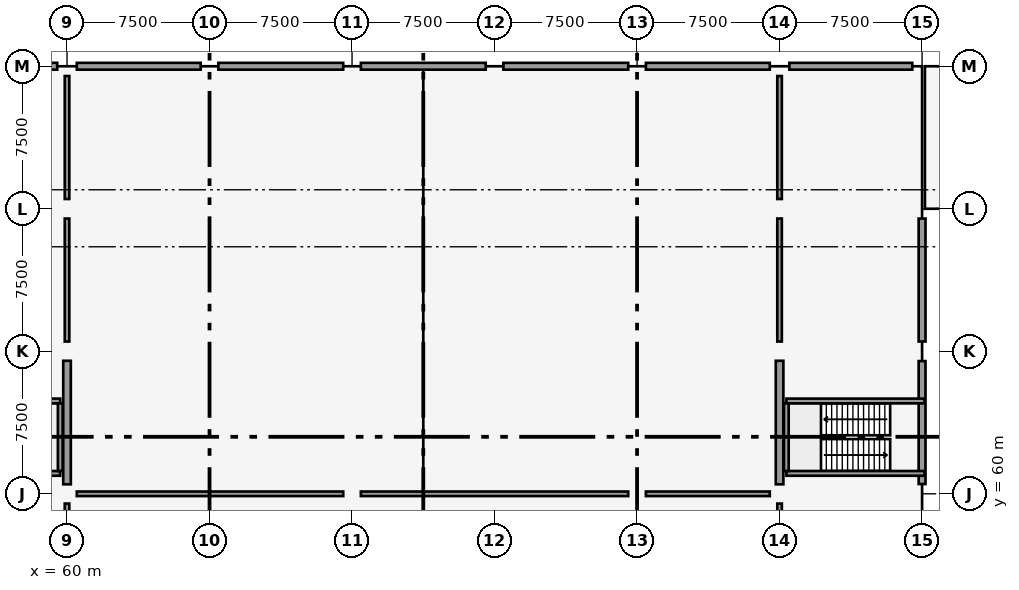
"""IFC4 building model, lengths in metres.
Left out: names, types, materials, properties, quantities, classifications, styles, units other than length and angle.
Written with IfcOpenShell. Run it as: python <this file> out.ifc"""

import sys

from ifc_helpers import new_model, si_unit, direction, frame, frame_2d, origin, origin_2d, place, context, subcontext, project, spatial, rectangle, extrude, element, fill, save


model = new_model("IFC4")
c1 = context("Model", 3, precision=1e-05, world=origin(), true_north=direction((0.0, 1.0)))
c2 = subcontext(c1, "Body", "Model", "MODEL_VIEW")
j1 = project(units=[si_unit("LENGTHUNIT", "METRE"), si_unit("PLANEANGLEUNIT", "RADIAN")], contexts=[c1])
p1 = place(None, origin())
s1 = spatial("IfcSite", under=j1, at=p1, CompositionType="ELEMENT")
p2 = place(p1, origin())
s2 = spatial("IfcBuilding", under=s1, at=p2, CompositionType="ELEMENT")
p3 = place(p2, origin())
s3 = spatial("IfcBuildingStorey", under=s2, at=p3, CompositionType="ELEMENT", Elevation=0.0)
for number, where, z_axis, x_axis in (
    (1, (60.0, 60.0, 0.0), (0.0, 0.0, 1.0), (1.0, 0.0, 0.0)),
    (2, (60.0, 67.5, 0.0), (0.0, 0.0, 1.0), (1.0, 0.0, 0.0)),
    (3, (60.0, 75.0, 0.0), (0.0, 0.0, 1.0), (1.0, 0.0, 0.0)),
    (4, (60.0, 82.5, 0.0), (0.0, 0.0, 1.0), (1.0, 0.0, 0.0)),
):
    element("IfcColumn", number, at=place(p3, frame(where, z_axis=z_axis, x_axis=x_axis)), inside=s3, PredefinedType="COLUMN", context=c2, shape_type="SweptSolid", body=[
        extrude(rectangle(XDim=1.0, YDim=1.0, at=origin_2d()), origin(), (0.0, 0.0, 1.0), 4.8),
    ])
for number, where, z_axis, x_axis in (
    (5, (67.5, 75.0, 0.0), (0.0, 0.0, 1.0), (1.0, 0.0, 0.0)),
    (6, (67.5, 82.5, 0.0), (0.0, 0.0, 1.0), (1.0, 0.0, 0.0)),
    (7, (75.0, 60.0, 0.0), (0.0, 0.0, 1.0), (1.0, 0.0, 0.0)),
    (8, (75.0, 67.5, 0.0), (0.0, 0.0, 1.0), (1.0, 0.0, 0.0)),
    (9, (75.0, 75.0, 0.0), (0.0, 0.0, 1.0), (1.0, 0.0, 0.0)),
    (10, (75.0, 82.5, 0.0), (0.0, 0.0, 1.0), (1.0, 0.0, 0.0)),
    (11, (82.5, 75.0, 0.0), (0.0, 0.0, 1.0), (1.0, 0.0, 0.0)),
    (12, (82.5, 82.5, 0.0), (0.0, 0.0, 1.0), (1.0, 0.0, 0.0)),
    (13, (90.0, 60.0, 0.0), (0.0, 0.0, 1.0), (1.0, 0.0, 0.0)),
    (14, (90.0, 67.5, 0.0), (0.0, 0.0, 1.0), (1.0, 0.0, 0.0)),
    (15, (90.0, 75.0, 0.0), (0.0, 0.0, 1.0), (1.0, 0.0, 0.0)),
    (16, (90.0, 82.5, 0.0), (0.0, 0.0, 1.0), (1.0, 0.0, 0.0)),
):
    element("IfcColumn", number, at=place(p3, frame(where, z_axis=z_axis, x_axis=x_axis)), inside=s3, PredefinedType="COLUMN", context=c2, shape_type="SweptSolid", body=[
        extrude(rectangle(XDim=0.9, YDim=0.9, at=origin_2d()), origin(), (0.0, 0.0, 1.0), 4.8),
    ])
for number, where, z_axis, x_axis in (
    (17, (97.5, 60.0, 0.0), (0.0, 0.0, 1.0), (1.0, 0.0, 0.0)),
    (18, (97.5, 67.5, 0.0), (0.0, 0.0, 1.0), (1.0, 0.0, 0.0)),
    (19, (97.5, 75.0, 0.0), (0.0, 0.0, 1.0), (1.0, 0.0, 0.0)),
    (20, (97.5, 82.5, 0.0), (0.0, 0.0, 1.0), (1.0, 0.0, 0.0)),
    (21, (105.0, 60.0, 0.0), (0.0, 0.0, 1.0), (1.0, 0.0, 0.0)),
    (22, (105.0, 67.5, 0.0), (0.0, 0.0, 1.0), (1.0, 0.0, 0.0)),
    (23, (105.0, 75.0, 0.0), (0.0, 0.0, 1.0), (1.0, 0.0, 0.0)),
    (24, (105.0, 82.5, 0.0), (0.0, 0.0, 1.0), (1.0, 0.0, 0.0)),
):
    element("IfcColumn", number, at=place(p3, frame(where, z_axis=z_axis, x_axis=x_axis)), inside=s3, PredefinedType="COLUMN", context=c2, shape_type="SweptSolid", body=[
        extrude(rectangle(XDim=1.0, YDim=1.0, at=origin_2d()), origin(), (0.0, 0.0, 1.0), 4.8),
    ])
p4 = place(p3, frame((105.0, 71.25, 0.0), z_axis=(0.0, 0.0, 1.0), x_axis=(1.0, 0.0, 0.0)))
e25 = element("IfcColumn", 25, at=p4, inside=s3, PredefinedType="PILASTER", context=c2, shape_type="SweptSolid", body=[
    extrude(rectangle(XDim=0.45, YDim=0.85, at=origin_2d()), origin(), (0.0, 0.0, 1.0), 4.8),
])
for number, where, z_axis, x_axis in (
    (26, (71.25, 82.5, 0.0), (0.0, 0.0, 1.0), (1.0, 0.0, 0.0)),
    (27, (86.25, 82.5, 0.0), (0.0, 0.0, 1.0), (1.0, 0.0, 0.0)),
):
    element("IfcColumn", number, at=place(p3, frame(where, z_axis=z_axis, x_axis=x_axis)), inside=s3, PredefinedType="PILASTER", context=c2, shape_type="SweptSolid", body=[
        extrude(rectangle(XDim=0.4, YDim=0.7, at=origin_2d()), origin(), (0.0, 0.0, 1.0), 4.8),
    ])
p5 = place(p3, frame((60.0, 60.5, 0.0), z_axis=(0.0, 0.0, 1.0), x_axis=(0.0, 1.0, 0.0)))
e28 = element("IfcWall", 28, at=p5, inside=s3, PredefinedType="SHEAR", context=c2, shape_type="SweptSolid", body=[
    extrude(rectangle(XDim=6.5, YDim=0.4, at=frame_2d((3.25, 0.0))), origin(), (0.0, 0.0, 1.0), 3.0),
])
p6 = place(p3, frame((97.5, 60.5, 0.0), z_axis=(0.0, 0.0, 1.0), x_axis=(0.0, 1.0, 0.0)))
e29 = element("IfcWall", 29, at=p6, inside=s3, PredefinedType="SHEAR", context=c2, shape_type="SweptSolid", body=[
    extrude(rectangle(XDim=6.5, YDim=0.4, at=frame_2d((3.25, 0.0))), origin(), (0.0, 0.0, 1.0), 3.6),
])
p7 = place(p3, frame((105.0, 60.515, 0.0), z_axis=(0.0, 0.0, 1.0), x_axis=(0.0, 1.0, 0.0)))
e30 = element("IfcWall", 30, at=p7, inside=s3, PredefinedType="SOLIDWALL", context=c2, shape_type="SweptSolid", body=[
    extrude(rectangle(XDim=6.47, YDim=0.36, at=frame_2d((3.235, 0.0))), origin(), (0.0, 0.0, 1.0), 3.57),
])
p8 = place(p7, frame((2.022, 0.0, 0.0)))
e31 = element("IfcOpeningElement", 31, at=p8, cuts=e30, PredefinedType="OPENING", context=c2, shape_type="SweptSolid", body=[
    extrude(rectangle(XDim=1.8, YDim=2.2, at=frame_2d((0.9, 1.1))), frame((0.0, 0.19, 0.0), z_axis=(0.0, -1.0, 0.0), x_axis=(1.0, 0.0, 0.0)), (0.0, 0.0, 1.0), 0.38),
])
p9 = place(p3, frame((105.0, 68.015, 0.0), z_axis=(0.0, 0.0, 1.0), x_axis=(0.0, 1.0, 0.0)))
e32 = element("IfcWall", 32, at=p9, inside=s3, PredefinedType="SOLIDWALL", context=c2, shape_type="SweptSolid", body=[
    extrude(rectangle(XDim=6.47, YDim=0.36, at=frame_2d((3.235, 0.0))), origin(), (0.0, 0.0, 1.0), 3.57),
])
p10 = place(p3, frame((53.015, 82.5, 0.0), z_axis=(0.0, 0.0, 1.0), x_axis=(1.0, 0.0, 0.0)))
e33 = element("IfcWall", 33, at=p10, inside=s3, PredefinedType="SOLIDWALL", context=c2, shape_type="SweptSolid", body=[
    extrude(rectangle(XDim=6.47, YDim=0.36, at=frame_2d((3.235, 0.0))), origin(), (0.0, 0.0, 1.0), 3.72),
])
p11 = place(p10, frame((2.685, 0.0, 0.6)))
e34 = element("IfcOpeningElement", 34, at=p11, cuts=e33, PredefinedType="OPENING", context=c2, shape_type="SweptSolid", body=[
    extrude(rectangle(XDim=1.1, YDim=1.8, at=frame_2d((0.55, 0.9))), frame((0.0, 0.19, 0.0), z_axis=(0.0, -1.0, 0.0), x_axis=(1.0, 0.0, 0.0)), (0.0, 0.0, 1.0), 0.38),
])
p12 = place(p3, frame((60.515, 82.5, 0.0), z_axis=(0.0, 0.0, 1.0), x_axis=(1.0, 0.0, 0.0)))
e35 = element("IfcWall", 35, at=p12, inside=s3, PredefinedType="SOLIDWALL", context=c2, shape_type="SweptSolid", body=[
    extrude(rectangle(XDim=6.52, YDim=0.36, at=frame_2d((3.26, 0.0))), origin(), (0.0, 0.0, 1.0), 3.72),
])
p13 = place(p12, frame((2.61, 0.0, 0.6)))
e36 = element("IfcOpeningElement", 36, at=p13, cuts=e35, PredefinedType="OPENING", context=c2, shape_type="SweptSolid", body=[
    extrude(rectangle(XDim=1.25, YDim=1.8, at=frame_2d((0.625, 0.9))), frame((0.0, 0.19, 0.0), z_axis=(0.0, -1.0, 0.0), x_axis=(1.0, 0.0, 0.0)), (0.0, 0.0, 1.0), 0.38),
])
p14 = place(p3, frame((67.965, 82.5, 0.0), z_axis=(0.0, 0.0, 1.0), x_axis=(1.0, 0.0, 0.0)))
e37 = element("IfcWall", 37, at=p14, inside=s3, PredefinedType="SOLIDWALL", context=c2, shape_type="SweptSolid", body=[
    extrude(rectangle(XDim=6.57, YDim=0.36, at=frame_2d((3.285, 0.0))), origin(), (0.0, 0.0, 1.0), 3.72),
])
p15 = place(p3, frame((75.465, 82.5, 0.0), z_axis=(0.0, 0.0, 1.0), x_axis=(1.0, 0.0, 0.0)))
e38 = element("IfcWall", 38, at=p15, inside=s3, PredefinedType="SOLIDWALL", context=c2, shape_type="SweptSolid", body=[
    extrude(rectangle(XDim=6.57, YDim=0.36, at=frame_2d((3.285, 0.0))), origin(), (0.0, 0.0, 1.0), 3.72),
])
p16 = place(p15, frame((2.51, 0.0, 0.6)))
e39 = element("IfcOpeningElement", 39, at=p16, cuts=e38, PredefinedType="OPENING", context=c2, shape_type="SweptSolid", body=[
    extrude(rectangle(XDim=1.55, YDim=1.8, at=frame_2d((0.775, 0.9))), frame((0.0, 0.19, 0.0), z_axis=(0.0, -1.0, 0.0), x_axis=(1.0, 0.0, 0.0)), (0.0, 0.0, 1.0), 0.38),
])
p17 = place(p3, frame((82.965, 82.5, 0.0), z_axis=(0.0, 0.0, 1.0), x_axis=(1.0, 0.0, 0.0)))
e40 = element("IfcWall", 40, at=p17, inside=s3, PredefinedType="SOLIDWALL", context=c2, shape_type="SweptSolid", body=[
    extrude(rectangle(XDim=6.57, YDim=0.36, at=frame_2d((3.285, 0.0))), origin(), (0.0, 0.0, 1.0), 3.72),
])
p18 = place(p3, frame((90.465, 82.5, 0.0), z_axis=(0.0, 0.0, 1.0), x_axis=(1.0, 0.0, 0.0)))
e41 = element("IfcWall", 41, at=p18, inside=s3, PredefinedType="SOLIDWALL", context=c2, shape_type="SweptSolid", body=[
    extrude(rectangle(XDim=6.52, YDim=0.36, at=frame_2d((3.26, 0.0))), origin(), (0.0, 0.0, 1.0), 3.72),
])
p19 = place(p18, frame((2.36, 0.0, 0.6)))
e42 = element("IfcOpeningElement", 42, at=p19, cuts=e41, PredefinedType="OPENING", context=c2, shape_type="SweptSolid", body=[
    extrude(rectangle(XDim=1.85, YDim=1.8, at=frame_2d((0.925, 0.9))), frame((0.0, 0.19, 0.0), z_axis=(0.0, -1.0, 0.0), x_axis=(1.0, 0.0, 0.0)), (0.0, 0.0, 1.0), 0.38),
])
p20 = place(p3, frame((98.015, 82.5, 0.0), z_axis=(0.0, 0.0, 1.0), x_axis=(1.0, 0.0, 0.0)))
e43 = element("IfcWall", 43, at=p20, inside=s3, PredefinedType="SOLIDWALL", context=c2, shape_type="SweptSolid", body=[
    extrude(rectangle(XDim=6.47, YDim=0.36, at=frame_2d((3.235, 0.0))), origin(), (0.0, 0.0, 1.0), 3.72),
])
p21 = place(p20, frame((2.235, 0.0, 0.6)))
e44 = element("IfcOpeningElement", 44, at=p21, cuts=e43, PredefinedType="OPENING", context=c2, shape_type="SweptSolid", body=[
    extrude(rectangle(XDim=2.0, YDim=1.45, at=frame_2d((1.0, 0.725))), frame((0.0, 0.19, 0.0), z_axis=(0.0, -1.0, 0.0), x_axis=(1.0, 0.0, 0.0)), (0.0, 0.0, 1.0), 0.38),
])
p22 = place(p3, frame((52.38, 61.075, 0.0), z_axis=(0.0, 0.0, 1.0), x_axis=(1.0, 0.0, 0.0)))
e45 = element("IfcWall", 45, at=p22, inside=s3, PredefinedType="SOLIDWALL", context=c2, shape_type="SweptSolid", body=[
    extrude(rectangle(XDim=7.26, YDim=0.25, at=frame_2d((3.63, 0.0))), origin(), (0.0, 0.0, 1.0), 4.5),
])
p23 = place(p22, frame((0.62, 0.0, 0.0)))
e46 = element("IfcOpeningElement", 46, at=p23, cuts=e45, PredefinedType="OPENING", context=c2, shape_type="SweptSolid", body=[
    extrude(rectangle(XDim=1.1, YDim=2.15, at=frame_2d((0.55, 1.075))), frame((0.0, 0.135, 0.0), z_axis=(0.0, -1.0, 0.0), x_axis=(1.0, 0.0, 0.0)), (0.0, 0.0, 1.0), 0.27),
])
p24 = place(p3, frame((52.38, 64.885, 0.0), z_axis=(0.0, 0.0, 1.0), x_axis=(1.0, 0.0, 0.0)))
e47 = element("IfcWall", 47, at=p24, inside=s3, PredefinedType="SOLIDWALL", context=c2, shape_type="SweptSolid", body=[
    extrude(rectangle(XDim=7.26, YDim=0.25, at=frame_2d((3.63, 0.0))), origin(), (0.0, 0.0, 1.0), 4.5),
])
p25 = place(p24, frame((0.62, 0.0, 0.0)))
e48 = element("IfcOpeningElement", 48, at=p25, cuts=e47, PredefinedType="OPENING", context=c2, shape_type="SweptSolid", body=[
    extrude(rectangle(XDim=1.1, YDim=2.15, at=frame_2d((0.55, 1.075))), frame((0.0, 0.135, 0.0), z_axis=(0.0, -1.0, 0.0), x_axis=(1.0, 0.0, 0.0)), (0.0, 0.0, 1.0), 0.27),
])
p26 = place(p3, frame((59.645, 61.2, 0.0), z_axis=(0.0, 0.0, 1.0), x_axis=(0.0, 1.0, 0.0)))
e49 = element("IfcWall", 49, at=p26, inside=s3, PredefinedType="SOLIDWALL", context=c2, shape_type="SweptSolid", body=[
    extrude(rectangle(XDim=3.56, YDim=0.25, at=frame_2d((1.78, 0.0))), origin(), (0.0, 0.0, 1.0), 4.5),
])
p27 = place(p3, frame((97.86, 61.075, 0.0), z_axis=(0.0, 0.0, 1.0), x_axis=(1.0, 0.0, 0.0)))
e50 = element("IfcWall", 50, at=p27, inside=s3, PredefinedType="SOLIDWALL", context=c2, shape_type="SweptSolid", body=[
    extrude(rectangle(XDim=7.26, YDim=0.25, at=frame_2d((3.63, 0.0))), origin(), (0.0, 0.0, 1.0), 4.5),
])
p28 = place(p27, frame((5.54, 0.0, 0.0)))
e51 = element("IfcOpeningElement", 51, at=p28, cuts=e50, PredefinedType="OPENING", context=c2, shape_type="SweptSolid", body=[
    extrude(rectangle(XDim=1.1, YDim=2.15, at=frame_2d((0.55, 1.075))), frame((0.0, 0.135, 0.0), z_axis=(0.0, -1.0, 0.0), x_axis=(1.0, 0.0, 0.0)), (0.0, 0.0, 1.0), 0.27),
])
p29 = place(p3, frame((97.86, 64.885, 0.0), z_axis=(0.0, 0.0, 1.0), x_axis=(1.0, 0.0, 0.0)))
e52 = element("IfcWall", 52, at=p29, inside=s3, PredefinedType="SOLIDWALL", context=c2, shape_type="SweptSolid", body=[
    extrude(rectangle(XDim=7.26, YDim=0.25, at=frame_2d((3.63, 0.0))), origin(), (0.0, 0.0, 1.0), 4.5),
])
p30 = place(p29, frame((5.54, 0.0, 0.0)))
e53 = element("IfcOpeningElement", 53, at=p30, cuts=e52, PredefinedType="OPENING", context=c2, shape_type="SweptSolid", body=[
    extrude(rectangle(XDim=1.1, YDim=2.15, at=frame_2d((0.55, 1.075))), frame((0.0, 0.135, 0.0), z_axis=(0.0, -1.0, 0.0), x_axis=(1.0, 0.0, 0.0)), (0.0, 0.0, 1.0), 0.27),
])
p31 = place(p3, frame((97.855, 61.2, 0.0), z_axis=(0.0, 0.0, 1.0), x_axis=(0.0, 1.0, 0.0)))
e54 = element("IfcWall", 54, at=p31, inside=s3, PredefinedType="SOLIDWALL", context=c2, shape_type="SweptSolid", body=[
    extrude(rectangle(XDim=3.56, YDim=0.25, at=frame_2d((1.78, 0.0))), origin(), (0.0, 0.0, 1.0), 4.5),
])
p32 = place(p3, frame((60.514, 60.0, 0.0), z_axis=(0.0, 0.0, 1.0), x_axis=(1.0, 0.0, 0.0)))
e55 = element("IfcWall", 55, at=p32, inside=s3, PredefinedType="PARTITIONING", context=c2, shape_type="SweptSolid", body=[
    extrude(rectangle(XDim=14.022, YDim=0.24, at=frame_2d((7.011, 0.0))), origin(), (0.0, 0.0, 1.0), 2.97),
])
p33 = place(p32, frame((2.436, 0.0, 0.0)))
e56 = element("IfcOpeningElement", 56, at=p33, cuts=e55, PredefinedType="OPENING", context=c2, shape_type="SweptSolid", body=[
    extrude(rectangle(XDim=1.6, YDim=2.15, at=frame_2d((0.8, 1.075))), frame((0.0, 0.13, 0.0), z_axis=(0.0, -1.0, 0.0), x_axis=(1.0, 0.0, 0.0)), (0.0, 0.0, 1.0), 0.26),
])
p34 = place(p3, frame((75.464, 60.0, 0.0), z_axis=(0.0, 0.0, 1.0), x_axis=(1.0, 0.0, 0.0)))
e57 = element("IfcWall", 57, at=p34, inside=s3, PredefinedType="PARTITIONING", context=c2, shape_type="SweptSolid", body=[
    extrude(rectangle(XDim=14.072, YDim=0.24, at=frame_2d((7.036, 0.0))), origin(), (0.0, 0.0, 1.0), 2.97),
])
p35 = place(p3, frame((90.464, 60.0, 0.0), z_axis=(0.0, 0.0, 1.0), x_axis=(1.0, 0.0, 0.0)))
e58 = element("IfcWall", 58, at=p35, inside=s3, PredefinedType="PARTITIONING", context=c2, shape_type="SweptSolid", body=[
    extrude(rectangle(XDim=6.522, YDim=0.24, at=frame_2d((3.261, 0.0))), origin(), (0.0, 0.0, 1.0), 2.97),
])
p36 = place(p35, frame((2.486, 0.0, 0.0)))
e59 = element("IfcOpeningElement", 59, at=p36, cuts=e58, PredefinedType="OPENING", context=c2, shape_type="SweptSolid", body=[
    extrude(rectangle(XDim=1.6, YDim=2.15, at=frame_2d((0.8, 1.075))), frame((0.0, 0.13, 0.0), z_axis=(0.0, -1.0, 0.0), x_axis=(1.0, 0.0, 0.0)), (0.0, 0.0, 1.0), 0.26),
])
p37 = place(p3, frame((60.0, 53.014, 0.0), z_axis=(0.0, 0.0, 1.0), x_axis=(0.0, 1.0, 0.0)))
e60 = element("IfcWall", 60, at=p37, inside=s3, PredefinedType="PARTITIONING", context=c2, shape_type="SweptSolid", body=[
    extrude(rectangle(XDim=6.472, YDim=0.24, at=frame_2d((3.236, 0.0))), origin(), (0.0, 0.0, 1.0), 2.97),
])
p38 = place(p37, frame((2.436, 0.0, 0.0)))
e61 = element("IfcOpeningElement", 61, at=p38, cuts=e60, PredefinedType="OPENING", context=c2, shape_type="SweptSolid", body=[
    extrude(rectangle(XDim=1.6, YDim=2.15, at=frame_2d((0.8, 1.075))), frame((0.0, 0.13, 0.0), z_axis=(0.0, -1.0, 0.0), x_axis=(1.0, 0.0, 0.0)), (0.0, 0.0, 1.0), 0.26),
])
p39 = place(p3, frame((60.0, 68.014, 0.0), z_axis=(0.0, 0.0, 1.0), x_axis=(0.0, 1.0, 0.0)))
e62 = element("IfcWall", 62, at=p39, inside=s3, PredefinedType="PARTITIONING", context=c2, shape_type="SweptSolid", body=[
    extrude(rectangle(XDim=6.472, YDim=0.24, at=frame_2d((3.236, 0.0))), origin(), (0.0, 0.0, 1.0), 2.97),
])
p40 = place(p39, frame((2.436, 0.0, 0.0)))
e63 = element("IfcOpeningElement", 63, at=p40, cuts=e62, PredefinedType="OPENING", context=c2, shape_type="SweptSolid", body=[
    extrude(rectangle(XDim=1.6, YDim=2.15, at=frame_2d((0.8, 1.075))), frame((0.0, 0.13, 0.0), z_axis=(0.0, -1.0, 0.0), x_axis=(1.0, 0.0, 0.0)), (0.0, 0.0, 1.0), 0.26),
])
p41 = place(p3, frame((60.0, 75.514, 0.0), z_axis=(0.0, 0.0, 1.0), x_axis=(0.0, 1.0, 0.0)))
e64 = element("IfcWall", 64, at=p41, inside=s3, PredefinedType="PARTITIONING", context=c2, shape_type="SweptSolid", body=[
    extrude(rectangle(XDim=6.472, YDim=0.24, at=frame_2d((3.236, 0.0))), origin(), (0.0, 0.0, 1.0), 3.57),
])
p42 = place(p3, frame((97.5, 53.014, 0.0), z_axis=(0.0, 0.0, 1.0), x_axis=(0.0, 1.0, 0.0)))
e65 = element("IfcWall", 65, at=p42, inside=s3, PredefinedType="PARTITIONING", context=c2, shape_type="SweptSolid", body=[
    extrude(rectangle(XDim=6.472, YDim=0.24, at=frame_2d((3.236, 0.0))), origin(), (0.0, 0.0, 1.0), 3.57),
])
p43 = place(p42, frame((2.436, 0.0, 0.0)))
e66 = element("IfcOpeningElement", 66, at=p43, cuts=e65, PredefinedType="OPENING", context=c2, shape_type="SweptSolid", body=[
    extrude(rectangle(XDim=1.6, YDim=2.15, at=frame_2d((0.8, 1.075))), frame((0.0, 0.13, 0.0), z_axis=(0.0, -1.0, 0.0), x_axis=(1.0, 0.0, 0.0)), (0.0, 0.0, 1.0), 0.26),
])
p44 = place(p3, frame((97.5, 68.014, 0.0), z_axis=(0.0, 0.0, 1.0), x_axis=(0.0, 1.0, 0.0)))
e67 = element("IfcWall", 67, at=p44, inside=s3, PredefinedType="PARTITIONING", context=c2, shape_type="SweptSolid", body=[
    extrude(rectangle(XDim=6.472, YDim=0.24, at=frame_2d((3.236, 0.0))), origin(), (0.0, 0.0, 1.0), 3.42),
])
p45 = place(p44, frame((2.436, 0.0, 0.0)))
e68 = element("IfcOpeningElement", 68, at=p45, cuts=e67, PredefinedType="OPENING", context=c2, shape_type="SweptSolid", body=[
    extrude(rectangle(XDim=1.6, YDim=2.15, at=frame_2d((0.8, 1.075))), frame((0.0, 0.13, 0.0), z_axis=(0.0, -1.0, 0.0), x_axis=(1.0, 0.0, 0.0)), (0.0, 0.0, 1.0), 0.26),
])
p46 = place(p3, frame((97.5, 75.514, 0.0), z_axis=(0.0, 0.0, 1.0), x_axis=(0.0, 1.0, 0.0)))
e69 = element("IfcWall", 69, at=p46, inside=s3, PredefinedType="PARTITIONING", context=c2, shape_type="SweptSolid", body=[
    extrude(rectangle(XDim=6.472, YDim=0.24, at=frame_2d((3.236, 0.0))), origin(), (0.0, 0.0, 1.0), 3.42),
])
p47 = place(p8, frame((1.8, 0.0, 0.0), z_axis=(0.0, 0.0, 1.0), x_axis=(-1.0, 0.0, 0.0)))
e70 = element("IfcDoor", 70, at=p47, inside=s3, OperationType="SINGLE_SWING_LEFT", PredefinedType="DOOR", context=c2, shape_type="SweptSolid", body=[
    extrude(rectangle(XDim=1.8, YDim=2.2, at=frame_2d((0.9, 1.1))), frame((0.0, 0.025, 0.0), z_axis=(0.0, -1.0, 0.0), x_axis=(1.0, 0.0, 0.0)), (0.0, 0.0, 1.0), 0.05),
])
fill(e31, e70)
p48 = place(p13, origin())
e71 = element("IfcWindow", 71, at=p48, inside=s3, PartitioningType="SINGLE_PANEL", PredefinedType="WINDOW", context=c2, shape_type="SweptSolid", body=[
    extrude(rectangle(XDim=1.25, YDim=1.8, at=frame_2d((0.625, 0.9))), frame((0.0, 0.03, 0.0), z_axis=(0.0, -1.0, 0.0), x_axis=(1.0, 0.0, 0.0)), (0.0, 0.0, 1.0), 0.06),
])
fill(e36, e71)
p49 = place(p16, origin())
e72 = element("IfcWindow", 72, at=p49, inside=s3, PartitioningType="SINGLE_PANEL", PredefinedType="WINDOW", context=c2, shape_type="SweptSolid", body=[
    extrude(rectangle(XDim=1.55, YDim=1.8, at=frame_2d((0.775, 0.9))), frame((0.0, 0.03, 0.0), z_axis=(0.0, -1.0, 0.0), x_axis=(1.0, 0.0, 0.0)), (0.0, 0.0, 1.0), 0.06),
])
fill(e39, e72)
p50 = place(p19, origin())
e73 = element("IfcWindow", 73, at=p50, inside=s3, PartitioningType="SINGLE_PANEL", PredefinedType="WINDOW", context=c2, shape_type="SweptSolid", body=[
    extrude(rectangle(XDim=1.85, YDim=1.8, at=frame_2d((0.925, 0.9))), frame((0.0, 0.03, 0.0), z_axis=(0.0, -1.0, 0.0), x_axis=(1.0, 0.0, 0.0)), (0.0, 0.0, 1.0), 0.06),
])
fill(e42, e73)
p51 = place(p21, origin())
e74 = element("IfcWindow", 74, at=p51, inside=s3, PartitioningType="SINGLE_PANEL", PredefinedType="WINDOW", context=c2, shape_type="SweptSolid", body=[
    extrude(rectangle(XDim=2.0, YDim=1.45, at=frame_2d((1.0, 0.725))), frame((0.0, 0.03, 0.0), z_axis=(0.0, -1.0, 0.0), x_axis=(1.0, 0.0, 0.0)), (0.0, 0.0, 1.0), 0.06),
])
fill(e44, e74)
p52 = place(p28, origin())
e75 = element("IfcDoor", 75, at=p52, inside=s3, OperationType="SINGLE_SWING_LEFT", PredefinedType="DOOR", context=c2, shape_type="SweptSolid", body=[
    extrude(rectangle(XDim=1.1, YDim=2.15, at=frame_2d((0.55, 1.075))), frame((0.0, 0.025, 0.0), z_axis=(0.0, -1.0, 0.0), x_axis=(1.0, 0.0, 0.0)), (0.0, 0.0, 1.0), 0.05),
])
fill(e51, e75)
p53 = place(p30, frame((1.1, 0.0, 0.0), z_axis=(0.0, 0.0, 1.0), x_axis=(-1.0, 0.0, 0.0)))
e76 = element("IfcDoor", 76, at=p53, inside=s3, OperationType="SINGLE_SWING_RIGHT", PredefinedType="DOOR", context=c2, shape_type="SweptSolid", body=[
    extrude(rectangle(XDim=1.1, YDim=2.15, at=frame_2d((0.55, 1.075))), frame((0.0, 0.025, 0.0), z_axis=(0.0, -1.0, 0.0), x_axis=(1.0, 0.0, 0.0)), (0.0, 0.0, 1.0), 0.05),
])
fill(e53, e76)
p54 = place(p33, origin())
e77 = element("IfcDoor", 77, at=p54, inside=s3, OperationType="SINGLE_SWING_RIGHT", PredefinedType="DOOR", context=c2, shape_type="SweptSolid", body=[
    extrude(rectangle(XDim=1.6, YDim=2.15, at=frame_2d((0.8, 1.075))), frame((0.0, 0.025, 0.0), z_axis=(0.0, -1.0, 0.0), x_axis=(1.0, 0.0, 0.0)), (0.0, 0.0, 1.0), 0.05),
])
fill(e56, e77)
p55 = place(p36, origin())
e78 = element("IfcDoor", 78, at=p55, inside=s3, OperationType="SINGLE_SWING_LEFT", PredefinedType="DOOR", context=c2, shape_type="SweptSolid", body=[
    extrude(rectangle(XDim=1.6, YDim=2.15, at=frame_2d((0.8, 1.075))), frame((0.0, 0.025, 0.0), z_axis=(0.0, -1.0, 0.0), x_axis=(1.0, 0.0, 0.0)), (0.0, 0.0, 1.0), 0.05),
])
fill(e59, e78)
p56 = place(p40, origin())
e79 = element("IfcDoor", 79, at=p56, inside=s3, OperationType="SINGLE_SWING_LEFT", PredefinedType="DOOR", context=c2, shape_type="SweptSolid", body=[
    extrude(rectangle(XDim=1.6, YDim=2.15, at=frame_2d((0.8, 1.075))), frame((0.0, 0.025, 0.0), z_axis=(0.0, -1.0, 0.0), x_axis=(1.0, 0.0, 0.0)), (0.0, 0.0, 1.0), 0.05),
])
fill(e63, e79)
p57 = place(p45, origin())
e80 = element("IfcDoor", 80, at=p57, inside=s3, OperationType="SINGLE_SWING_LEFT", PredefinedType="DOOR", context=c2, shape_type="SweptSolid", body=[
    extrude(rectangle(XDim=1.6, YDim=2.15, at=frame_2d((0.8, 1.075))), frame((0.0, 0.025, 0.0), z_axis=(0.0, -1.0, 0.0), x_axis=(1.0, 0.0, 0.0)), (0.0, 0.0, 1.0), 0.05),
])
fill(e68, e80)
save(model, sys.argv[1])
